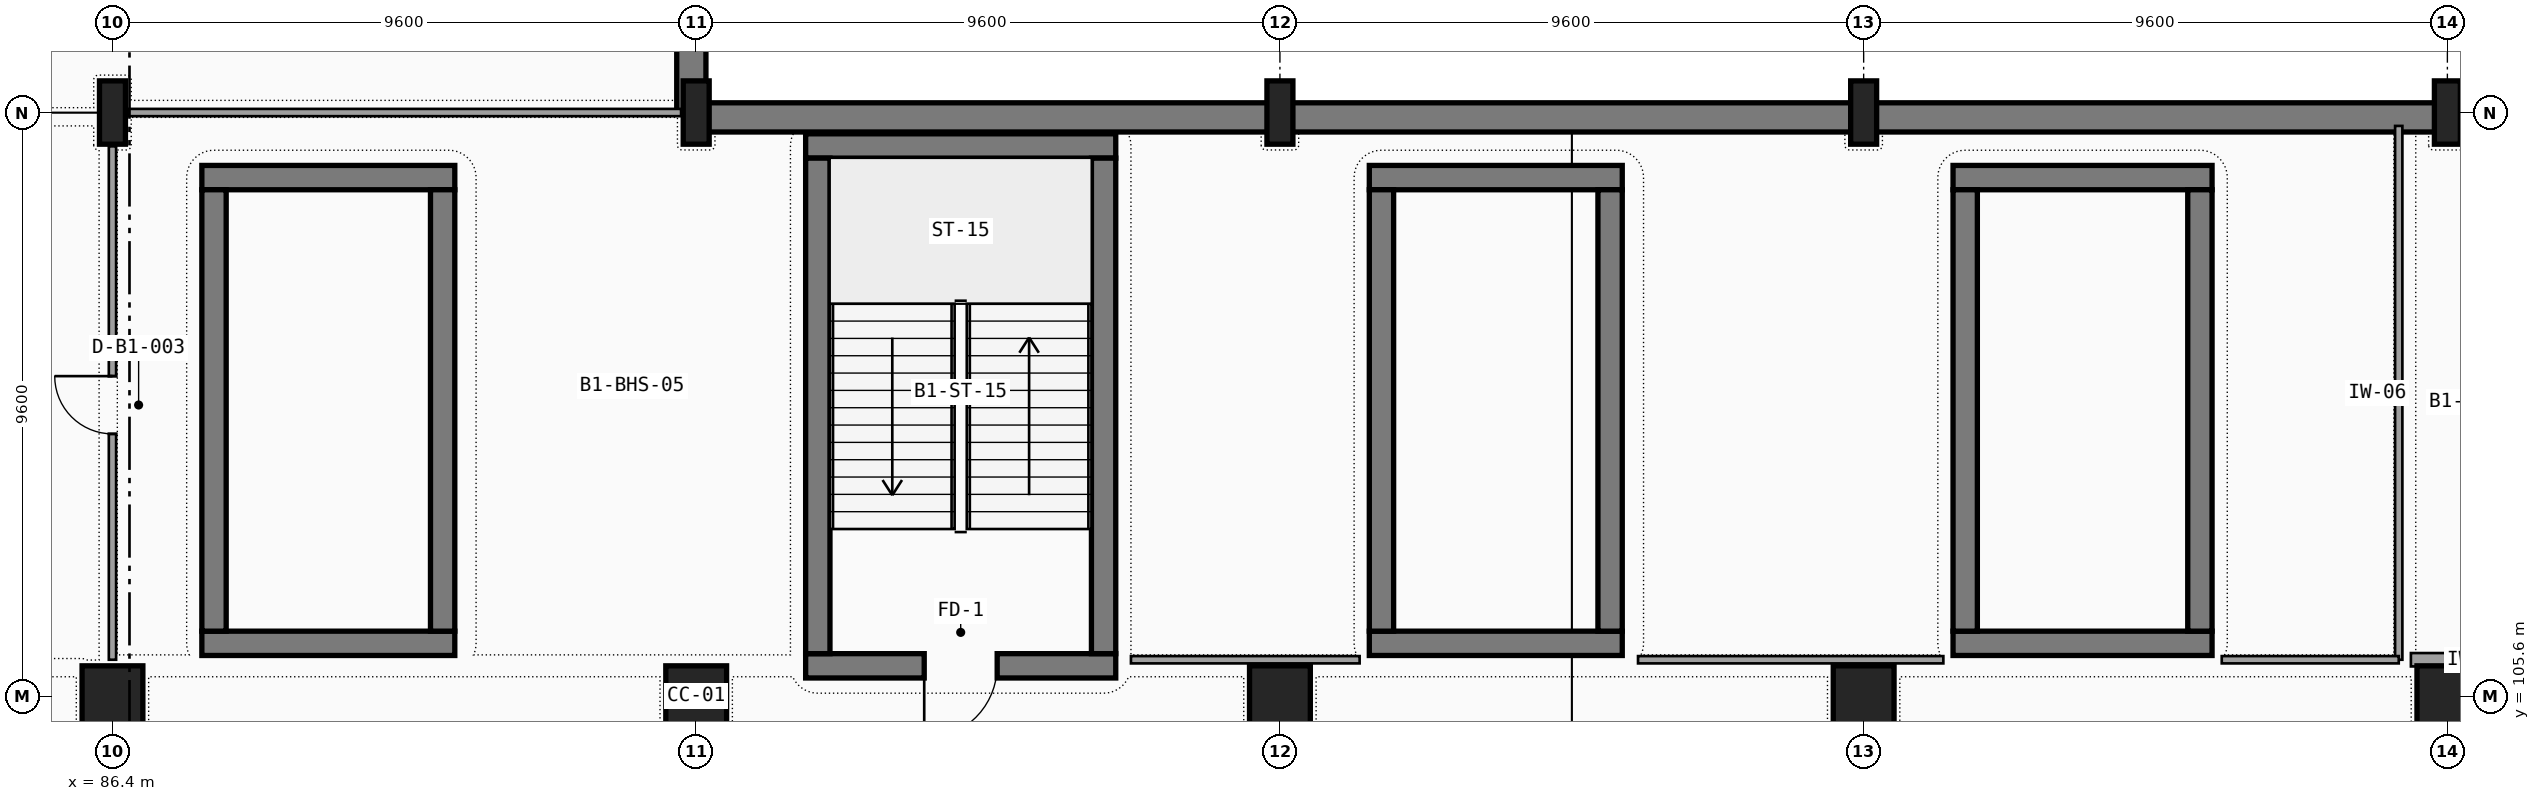
"""IFC4 building model, lengths in metres.
Left out: names, types, materials, properties, quantities, classifications, styles, units other than length and angle.
Written with IfcOpenShell. Run it as: python <this file> out.ifc"""

import sys

from ifc_helpers import new_model, si_unit, direction, frame, frame_2d, origin, origin_2d, place, context, subcontext, project, spatial, rectangle, i_section, extrude, element, fill, save


model = new_model("IFC4")
c1 = context("Model", 3, precision=1e-05, world=origin(), true_north=direction((0.0, 1.0)))
c2 = subcontext(c1, "Body", "Model", "MODEL_VIEW")
j1 = project(units=[si_unit("LENGTHUNIT", "METRE"), si_unit("PLANEANGLEUNIT", "RADIAN")], contexts=[c1])
p1 = place(None, origin())
s1 = spatial("IfcSite", under=j1, at=p1, CompositionType="ELEMENT")
p2 = place(p1, origin())
s2 = spatial("IfcBuilding", under=s1, at=p2, CompositionType="ELEMENT")
p3 = place(p2, frame((0.0, 0.0, -4.8)))
s3 = spatial("IfcBuildingStorey", under=s2, at=p3, CompositionType="ELEMENT", Elevation=-4.8)
p4 = place(p3, frame((86.4, 105.6, 0.0), z_axis=(0.0, 0.0, 1.0), x_axis=(1.0, 0.0, 0.0)))
e1 = element("IfcColumn", 1, at=p4, inside=s3, PredefinedType="COLUMN", context=c2, shape_type="SweptSolid", body=[
    extrude(rectangle(XDim=1.0, YDim=1.0, at=origin_2d()), origin(), (0.0, 0.0, 1.0), 4.8),
])
p5 = place(p3, frame((86.4, 115.2, 0.0), z_axis=(0.0, 0.0, 1.0), x_axis=(1.0, 0.0, 0.0)))
e2 = element("IfcColumn", 2, at=p5, inside=s3, PredefinedType="COLUMN", context=c2, shape_type="SweptSolid", body=[
    extrude(i_section(OverallWidth=0.427, OverallDepth=1.042, WebThickness=0.031, FlangeThickness=0.056, FilletRadius=0.031, at=origin_2d()), origin(), (0.0, 0.0, 1.0), 4.8),
])
p6 = place(p3, frame((96.0, 105.6, 0.0), z_axis=(0.0, 0.0, 1.0), x_axis=(1.0, 0.0, 0.0)))
e3 = element("IfcColumn", 3, at=p6, inside=s3, PredefinedType="COLUMN", context=c2, shape_type="SweptSolid", body=[
    extrude(rectangle(XDim=1.0, YDim=1.0, at=origin_2d()), origin(), (0.0, 0.0, 1.0), 4.8),
])
p7 = place(p3, frame((96.0, 115.2, 0.0), z_axis=(0.0, 0.0, 1.0), x_axis=(1.0, 0.0, 0.0)))
e4 = element("IfcColumn", 4, at=p7, inside=s3, PredefinedType="COLUMN", context=c2, shape_type="SweptSolid", body=[
    extrude(i_section(OverallWidth=0.427, OverallDepth=1.042, WebThickness=0.031, FlangeThickness=0.056, FilletRadius=0.031, at=origin_2d()), origin(), (0.0, 0.0, 1.0), 4.8),
])
p8 = place(p3, frame((105.6, 105.6, 0.0), z_axis=(0.0, 0.0, 1.0), x_axis=(1.0, 0.0, 0.0)))
e5 = element("IfcColumn", 5, at=p8, inside=s3, PredefinedType="COLUMN", context=c2, shape_type="SweptSolid", body=[
    extrude(rectangle(XDim=1.0, YDim=1.0, at=origin_2d()), origin(), (0.0, 0.0, 1.0), 4.8),
])
p9 = place(p3, frame((105.6, 115.2, 0.0), z_axis=(0.0, 0.0, 1.0), x_axis=(1.0, 0.0, 0.0)))
e6 = element("IfcColumn", 6, at=p9, inside=s3, PredefinedType="COLUMN", context=c2, shape_type="SweptSolid", body=[
    extrude(i_section(OverallWidth=0.427, OverallDepth=1.042, WebThickness=0.031, FlangeThickness=0.056, FilletRadius=0.031, at=origin_2d()), origin(), (0.0, 0.0, 1.0), 4.8),
])
p10 = place(p3, frame((115.2, 105.6, 0.0), z_axis=(0.0, 0.0, 1.0), x_axis=(1.0, 0.0, 0.0)))
e7 = element("IfcColumn", 7, at=p10, inside=s3, PredefinedType="COLUMN", context=c2, shape_type="SweptSolid", body=[
    extrude(rectangle(XDim=1.0, YDim=1.0, at=origin_2d()), origin(), (0.0, 0.0, 1.0), 4.8),
])
p11 = place(p3, frame((115.2, 115.2, 0.0), z_axis=(0.0, 0.0, 1.0), x_axis=(1.0, 0.0, 0.0)))
e8 = element("IfcColumn", 8, at=p11, inside=s3, PredefinedType="COLUMN", context=c2, shape_type="SweptSolid", body=[
    extrude(i_section(OverallWidth=0.427, OverallDepth=1.042, WebThickness=0.031, FlangeThickness=0.056, FilletRadius=0.031, at=origin_2d()), origin(), (0.0, 0.0, 1.0), 4.8),
])
p12 = place(p3, frame((124.8, 105.6, 0.0), z_axis=(0.0, 0.0, 1.0), x_axis=(1.0, 0.0, 0.0)))
e9 = element("IfcColumn", 9, at=p12, inside=s3, PredefinedType="COLUMN", context=c2, shape_type="SweptSolid", body=[
    extrude(rectangle(XDim=1.0, YDim=1.0, at=origin_2d()), origin(), (0.0, 0.0, 1.0), 4.8),
])
p13 = place(p3, frame((124.8, 115.2, 0.0), z_axis=(0.0, 0.0, 1.0), x_axis=(1.0, 0.0, 0.0)))
e10 = element("IfcColumn", 10, at=p13, inside=s3, PredefinedType="COLUMN", context=c2, shape_type="SweptSolid", body=[
    extrude(i_section(OverallWidth=0.427, OverallDepth=1.042, WebThickness=0.031, FlangeThickness=0.056, FilletRadius=0.031, at=origin_2d()), origin(), (0.0, 0.0, 1.0), 4.8),
])
p14 = place(p3, frame((134.4, 115.12, 0.0), z_axis=(0.0, 0.0, 1.0), x_axis=(-1.0, 0.0, 0.0)))
e11 = element("IfcWall", 11, at=p14, inside=s3, PredefinedType="USERDEFINED", context=c2, shape_type="SweptSolid", body=[
    extrude(rectangle(XDim=9.6, YDim=0.48, at=frame_2d((4.8, 0.0))), origin(), (0.0, 0.0, 1.0), 3.573),
])
p15 = place(p3, frame((124.8, 115.12, 0.0), z_axis=(0.0, 0.0, 1.0), x_axis=(-1.0, 0.0, 0.0)))
e12 = element("IfcWall", 12, at=p15, inside=s3, PredefinedType="USERDEFINED", context=c2, shape_type="SweptSolid", body=[
    extrude(rectangle(XDim=9.6, YDim=0.48, at=frame_2d((4.8, 0.0))), origin(), (0.0, 0.0, 1.0), 3.573),
])
p16 = place(p3, frame((115.2, 115.12, 0.0), z_axis=(0.0, 0.0, 1.0), x_axis=(-1.0, 0.0, 0.0)))
e13 = element("IfcWall", 13, at=p16, inside=s3, PredefinedType="USERDEFINED", context=c2, shape_type="SweptSolid", body=[
    extrude(rectangle(XDim=9.6, YDim=0.48, at=frame_2d((4.8, 0.0))), origin(), (0.0, 0.0, 1.0), 3.573),
])
for number, where, z_axis, x_axis in (
    (14, (105.6, 115.12, 0.0), (0.0, 0.0, 1.0), (-1.0, 0.0, 0.0)),
    (15, (95.92, 115.2, 0.0), (0.0, 0.0, 1.0), (0.0, 1.0, 0.0)),
):
    element("IfcWall", number, at=place(p3, frame(where, z_axis=z_axis, x_axis=x_axis)), inside=s3, PredefinedType="USERDEFINED", context=c2, shape_type="SweptSolid", body=[
        extrude(rectangle(XDim=9.6, YDim=0.48, at=frame_2d((4.8, 0.0))), origin(), (0.0, 0.0, 1.0), 3.573),
    ])
p17 = place(p3, frame((97.8, 106.1, 0.0), z_axis=(0.0, 0.0, 1.0), x_axis=(1.0, 0.0, 0.0)))
e16 = element("IfcWall", 16, at=p17, inside=s3, PredefinedType="SHEAR", context=c2, shape_type="SweptSolid", body=[
    extrude(rectangle(XDim=5.1, YDim=0.4, at=frame_2d((2.55, 0.0))), origin(), (0.0, 0.0, 1.0), 4.5),
])
p18 = place(p17, frame((3.15, 0.0, 0.0), z_axis=(0.0, 0.0, 1.0), x_axis=(-1.0, 0.0, 0.0)))
e17 = element("IfcOpeningElement", 17, at=p18, cuts=e16, PredefinedType="OPENING", context=c2, shape_type="SweptSolid", body=[
    extrude(rectangle(XDim=1.2, YDim=2.2, at=frame_2d((0.6, 1.1))), frame((0.0, 0.21, 0.0), z_axis=(0.0, -1.0, 0.0), x_axis=(1.0, 0.0, 0.0)), (0.0, 0.0, 1.0), 0.42),
])
p19 = place(p3, frame((102.9, 114.65, 0.0), z_axis=(0.0, 0.0, 1.0), x_axis=(-1.0, 0.0, 0.0)))
e18 = element("IfcWall", 18, at=p19, inside=s3, PredefinedType="SHEAR", context=c2, shape_type="SweptSolid", body=[
    extrude(rectangle(XDim=5.1, YDim=0.4, at=frame_2d((2.55, 0.0))), origin(), (0.0, 0.0, 1.0), 4.5),
])
for number, where, z_axis, x_axis in (
    (19, (98.0, 114.45, 0.0), (0.0, 0.0, 1.0), (0.0, -1.0, 0.0)),
    (20, (102.7, 106.3, 0.0), (0.0, 0.0, 1.0), (0.0, 1.0, 0.0)),
):
    element("IfcWall", number, at=place(p3, frame(where, z_axis=z_axis, x_axis=x_axis)), inside=s3, PredefinedType="SHEAR", context=c2, shape_type="SweptSolid", body=[
        extrude(rectangle(XDim=8.15, YDim=0.4, at=frame_2d((4.075, 0.0))), origin(), (0.0, 0.0, 1.0), 4.5),
    ])
for number, where, z_axis, x_axis in (
    (21, (87.87, 106.47, 0.0), (0.0, 0.0, 1.0), (1.0, 0.0, 0.0)),
    (22, (92.03, 114.13, 0.0), (0.0, 0.0, 1.0), (-1.0, 0.0, 0.0)),
):
    element("IfcWall", number, at=place(p3, frame(where, z_axis=z_axis, x_axis=x_axis)), inside=s3, PredefinedType="SHEAR", context=c2, shape_type="SweptSolid", body=[
        extrude(rectangle(XDim=4.16, YDim=0.4, at=frame_2d((2.08, 0.0))), origin(), (0.0, 0.0, 1.0), 4.5),
    ])
for number, where, z_axis, x_axis in (
    (23, (88.07, 113.93, 0.0), (0.0, 0.0, 1.0), (0.0, -1.0, 0.0)),
    (24, (91.83, 106.67, 0.0), (0.0, 0.0, 1.0), (0.0, 1.0, 0.0)),
):
    element("IfcWall", number, at=place(p3, frame(where, z_axis=z_axis, x_axis=x_axis)), inside=s3, PredefinedType="SHEAR", context=c2, shape_type="SweptSolid", body=[
        extrude(rectangle(XDim=7.26, YDim=0.4, at=frame_2d((3.63, 0.0))), origin(), (0.0, 0.0, 1.0), 4.5),
    ])
for number, where, z_axis, x_axis in (
    (25, (107.07, 106.47, 0.0), (0.0, 0.0, 1.0), (1.0, 0.0, 0.0)),
    (26, (111.23, 114.13, 0.0), (0.0, 0.0, 1.0), (-1.0, 0.0, 0.0)),
):
    element("IfcWall", number, at=place(p3, frame(where, z_axis=z_axis, x_axis=x_axis)), inside=s3, PredefinedType="SHEAR", context=c2, shape_type="SweptSolid", body=[
        extrude(rectangle(XDim=4.16, YDim=0.4, at=frame_2d((2.08, 0.0))), origin(), (0.0, 0.0, 1.0), 4.5),
    ])
for number, where, z_axis, x_axis in (
    (27, (107.27, 113.93, 0.0), (0.0, 0.0, 1.0), (0.0, -1.0, 0.0)),
    (28, (111.03, 106.67, 0.0), (0.0, 0.0, 1.0), (0.0, 1.0, 0.0)),
):
    element("IfcWall", number, at=place(p3, frame(where, z_axis=z_axis, x_axis=x_axis)), inside=s3, PredefinedType="SHEAR", context=c2, shape_type="SweptSolid", body=[
        extrude(rectangle(XDim=7.26, YDim=0.4, at=frame_2d((3.63, 0.0))), origin(), (0.0, 0.0, 1.0), 4.5),
    ])
for number, where, z_axis, x_axis in (
    (29, (116.67, 106.47, 0.0), (0.0, 0.0, 1.0), (1.0, 0.0, 0.0)),
    (30, (120.93, 114.13, 0.0), (0.0, 0.0, 1.0), (-1.0, 0.0, 0.0)),
):
    element("IfcWall", number, at=place(p3, frame(where, z_axis=z_axis, x_axis=x_axis)), inside=s3, PredefinedType="SHEAR", context=c2, shape_type="SweptSolid", body=[
        extrude(rectangle(XDim=4.26, YDim=0.4, at=frame_2d((2.13, 0.0))), origin(), (0.0, 0.0, 1.0), 4.5),
    ])
for number, where, z_axis, x_axis in (
    (31, (116.87, 113.93, 0.0), (0.0, 0.0, 1.0), (0.0, -1.0, 0.0)),
    (32, (120.73, 106.67, 0.0), (0.0, 0.0, 1.0), (0.0, 1.0, 0.0)),
):
    element("IfcWall", number, at=place(p3, frame(where, z_axis=z_axis, x_axis=x_axis)), inside=s3, PredefinedType="SHEAR", context=c2, shape_type="SweptSolid", body=[
        extrude(rectangle(XDim=7.26, YDim=0.4, at=frame_2d((3.63, 0.0))), origin(), (0.0, 0.0, 1.0), 4.5),
    ])
p20 = place(p3, frame((124.0, 114.98, 0.0), z_axis=(0.0, 0.0, 1.0), x_axis=(0.0, -1.0, 0.0)))
e33 = element("IfcWall", 33, at=p20, inside=s3, PredefinedType="PARTITIONING", context=c2, shape_type="SweptSolid", body=[
    extrude(rectangle(XDim=8.78, YDim=0.12, at=frame_2d((4.39, 0.0))), origin(), (0.0, 0.0, 1.0), 4.5),
])
p21 = place(p3, frame((124.0, 106.2, 0.0), z_axis=(0.0, 0.0, 1.0), x_axis=(-1.0, 0.0, 0.0)))
e34 = element("IfcWall", 34, at=p21, inside=s3, PredefinedType="PARTITIONING", context=c2, shape_type="SweptSolid", body=[
    extrude(rectangle(XDim=2.911, YDim=0.12, at=frame_2d((1.455, 0.0))), origin(), (0.0, 0.0, 1.0), 4.5),
])
p22 = place(p3, frame((116.511, 106.2, 0.0), z_axis=(0.0, 0.0, 1.0), x_axis=(-1.0, 0.0, 0.0)))
e35 = element("IfcWall", 35, at=p22, inside=s3, PredefinedType="PARTITIONING", context=c2, shape_type="SweptSolid", body=[
    extrude(rectangle(XDim=5.021, YDim=0.12, at=frame_2d((2.511, 0.0))), origin(), (0.0, 0.0, 1.0), 3.7),
])
p23 = place(p3, frame((106.911, 106.2, 0.0), z_axis=(0.0, 0.0, 1.0), x_axis=(-1.0, 0.0, 0.0)))
e36 = element("IfcWall", 36, at=p23, inside=s3, PredefinedType="PARTITIONING", context=c2, shape_type="SweptSolid", body=[
    extrude(rectangle(XDim=3.761, YDim=0.12, at=frame_2d((1.88, 0.0))), origin(), (0.0, 0.0, 1.0), 3.7),
])
p24 = place(p3, frame((86.4, 106.2, 0.0), z_axis=(0.0, 0.0, 1.0), x_axis=(0.0, 1.0, 0.0)))
e37 = element("IfcWall", 37, at=p24, inside=s3, PredefinedType="PARTITIONING", context=c2, shape_type="SweptSolid", body=[
    extrude(rectangle(XDim=8.444, YDim=0.12, at=frame_2d((4.222, 0.0))), origin(), (0.0, 0.0, 1.0), 3.7),
])
p25 = place(p24, frame((3.715, 0.0, 0.0), z_axis=(0.0, 0.0, 1.0), x_axis=(1.0, 0.0, 0.0)))
e38 = element("IfcOpeningElement", 38, at=p25, cuts=e37, PredefinedType="OPENING", context=c2, shape_type="SweptSolid", body=[
    extrude(rectangle(XDim=0.95, YDim=2.15, at=frame_2d((0.475, 1.075))), frame((0.0, 0.07, 0.0), z_axis=(0.0, -1.0, 0.0), x_axis=(1.0, 0.0, 0.0)), (0.0, 0.0, 1.0), 0.14),
])
p26 = place(p3, frame((86.648, 115.2, 0.0), z_axis=(0.0, 0.0, 1.0), x_axis=(1.0, 0.0, 0.0)))
e39 = element("IfcWall", 39, at=p26, inside=s3, PredefinedType="PARTITIONING", context=c2, shape_type="SweptSolid", body=[
    extrude(rectangle(XDim=9.103, YDim=0.12, at=frame_2d((4.552, 0.0))), origin(), (0.0, 0.0, 1.0), 3.573),
])
p27 = place(p3, frame((126.35, 106.2, 0.0), z_axis=(0.0, 0.0, 1.0), x_axis=(-1.0, 0.0, 0.0)))
e40 = element("IfcWall", 40, at=p27, inside=s3, PredefinedType="PARTITIONING", context=c2, shape_type="SweptSolid", body=[
    extrude(rectangle(XDim=2.15, YDim=0.22, at=frame_2d((1.075, 0.0))), origin(), (0.0, 0.0, 1.0), 3.7),
])
p28 = place(p18, origin())
e41 = element("IfcDoor", 41, at=p28, inside=s3, OperationType="SINGLE_SWING_RIGHT", PredefinedType="DOOR", context=c2, shape_type="SweptSolid", body=[
    extrude(rectangle(XDim=1.2, YDim=2.2, at=frame_2d((0.6, 1.1))), frame((0.0, 0.025, 0.0), z_axis=(0.0, -1.0, 0.0), x_axis=(1.0, 0.0, 0.0)), (0.0, 0.0, 1.0), 0.05),
])
fill(e17, e41)
p29 = place(p25, origin())
e42 = element("IfcDoor", 42, at=p29, inside=s3, OperationType="SINGLE_SWING_RIGHT", PredefinedType="DOOR", context=c2, shape_type="SweptSolid", body=[
    extrude(rectangle(XDim=0.95, YDim=2.15, at=frame_2d((0.475, 1.075))), frame((0.0, 0.025, 0.0), z_axis=(0.0, -1.0, 0.0), x_axis=(1.0, 0.0, 0.0)), (0.0, 0.0, 1.0), 0.05),
])
fill(e38, e42)
save(model, sys.argv[1])
